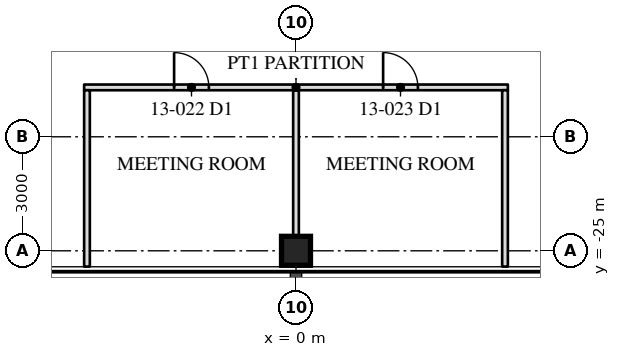
"""IFC4 building model, lengths in metres.
Left out: names, types, materials, properties, quantities, classifications, styles, units other than length and angle.
Written with IfcOpenShell. Run it as: python <this file> out.ifc"""

import sys

from ifc_helpers import new_model, si_unit, direction, frame, frame_2d, origin, origin_2d, place, context, subcontext, project, spatial, rectangle, hollow_rectangle, extrude, element, fill, save


model = new_model("IFC4")
c1 = context("Model", 3, precision=1e-05, world=origin(), true_north=direction((0.0, 1.0)))
c2 = subcontext(c1, "Body", "Model", "MODEL_VIEW")
j1 = project(units=[si_unit("LENGTHUNIT", "METRE"), si_unit("PLANEANGLEUNIT", "RADIAN")], contexts=[c1])
p1 = place(None, origin())
s1 = spatial("IfcSite", under=j1, at=p1, CompositionType="ELEMENT")
p2 = place(p1, origin())
s2 = spatial("IfcBuilding", under=s1, at=p2, CompositionType="ELEMENT")
p3 = place(p2, frame((0.0, 0.0, 57.0)))
s3 = spatial("IfcBuildingStorey", under=s2, at=p3, CompositionType="ELEMENT", Elevation=57.0)
p4 = place(p3, frame((0.0, -25.0, 0.0), z_axis=(0.0, 0.0, 1.0), x_axis=(1.0, 0.0, 0.0)))
e1 = element("IfcColumn", 1, at=p4, inside=s3, PredefinedType="COLUMN", context=c2, shape_type="SweptSolid", body=[
    extrude(hollow_rectangle(XDim=0.762, YDim=0.762, WallThickness=0.127, at=origin_2d()), origin(), (0.0, 0.0, 1.0), 4.1),
])
p5 = place(p3, frame((-5.575, -20.7, 0.0), z_axis=(0.0, 0.0, 1.0), x_axis=(1.0, 0.0, 0.0)))
e2 = element("IfcWall", 2, at=p5, inside=s3, PredefinedType="PARTITIONING", context=c2, shape_type="SweptSolid", body=[
    extrude(rectangle(XDim=11.15, YDim=0.15, at=frame_2d((5.575, 0.0))), origin(), (0.0, 0.0, 1.0), 3.91),
])
p6 = place(p5, frame((2.367, 0.0, 0.0)))
e3 = element("IfcOpeningElement", 3, at=p6, cuts=e2, PredefinedType="OPENING", context=c2, shape_type="SweptSolid", body=[
    extrude(rectangle(XDim=0.915, YDim=2.134, at=frame_2d((0.458, 1.067))), frame((0.0, 0.085, 0.0), z_axis=(0.0, -1.0, 0.0), x_axis=(1.0, 0.0, 0.0)), (0.0, 0.0, 1.0), 0.17),
])
p7 = place(p5, frame((7.867, 0.0, 0.0)))
e4 = element("IfcOpeningElement", 4, at=p7, cuts=e2, PredefinedType="OPENING", context=c2, shape_type="SweptSolid", body=[
    extrude(rectangle(XDim=0.915, YDim=2.134, at=frame_2d((0.458, 1.067))), frame((0.0, 0.085, 0.0), z_axis=(0.0, -1.0, 0.0), x_axis=(1.0, 0.0, 0.0)), (0.0, 0.0, 1.0), 0.17),
])
p8 = place(p3, frame((-5.5, -20.775, 0.0), z_axis=(0.0, 0.0, 1.0), x_axis=(0.0, -1.0, 0.0)))
e5 = element("IfcWall", 5, at=p8, inside=s3, PredefinedType="PARTITIONING", context=c2, shape_type="SweptSolid", body=[
    extrude(rectangle(XDim=4.64, YDim=0.15, at=frame_2d((2.32, 0.0))), origin(), (0.0, 0.0, 1.0), 3.91),
])
p9 = place(p3, frame((0.0, -20.775, 0.0), z_axis=(0.0, 0.0, 1.0), x_axis=(0.0, -1.0, 0.0)))
e6 = element("IfcWall", 6, at=p9, inside=s3, PredefinedType="PARTITIONING", context=c2, shape_type="SweptSolid", body=[
    extrude(rectangle(XDim=4.64, YDim=0.15, at=frame_2d((2.32, 0.0))), origin(), (0.0, 0.0, 1.0), 3.13),
])
p10 = place(p3, frame((5.5, -20.775, 0.0), z_axis=(0.0, 0.0, 1.0), x_axis=(0.0, -1.0, 0.0)))
e7 = element("IfcWall", 7, at=p10, inside=s3, PredefinedType="PARTITIONING", context=c2, shape_type="SweptSolid", body=[
    extrude(rectangle(XDim=4.64, YDim=0.15, at=frame_2d((2.32, 0.0))), origin(), (0.0, 0.0, 1.0), 3.91),
])
p11 = place(p6, origin())
e8 = element("IfcDoor", 8, at=p11, inside=s3, OperationType="SINGLE_SWING_LEFT", PredefinedType="DOOR", context=c2, shape_type="SweptSolid", body=[
    extrude(rectangle(XDim=0.915, YDim=2.134, at=frame_2d((0.458, 1.067))), frame((0.0, 0.025, 0.0), z_axis=(0.0, -1.0, 0.0), x_axis=(1.0, 0.0, 0.0)), (0.0, 0.0, 1.0), 0.05),
])
fill(e3, e8)
p12 = place(p7, origin())
e9 = element("IfcDoor", 9, at=p12, inside=s3, OperationType="SINGLE_SWING_LEFT", PredefinedType="DOOR", context=c2, shape_type="SweptSolid", body=[
    extrude(rectangle(XDim=0.915, YDim=2.134, at=frame_2d((0.458, 1.067))), frame((0.0, 0.025, 0.0), z_axis=(0.0, -1.0, 0.0), x_axis=(1.0, 0.0, 0.0)), (0.0, 0.0, 1.0), 0.05),
])
fill(e4, e9)
save(model, sys.argv[1])
